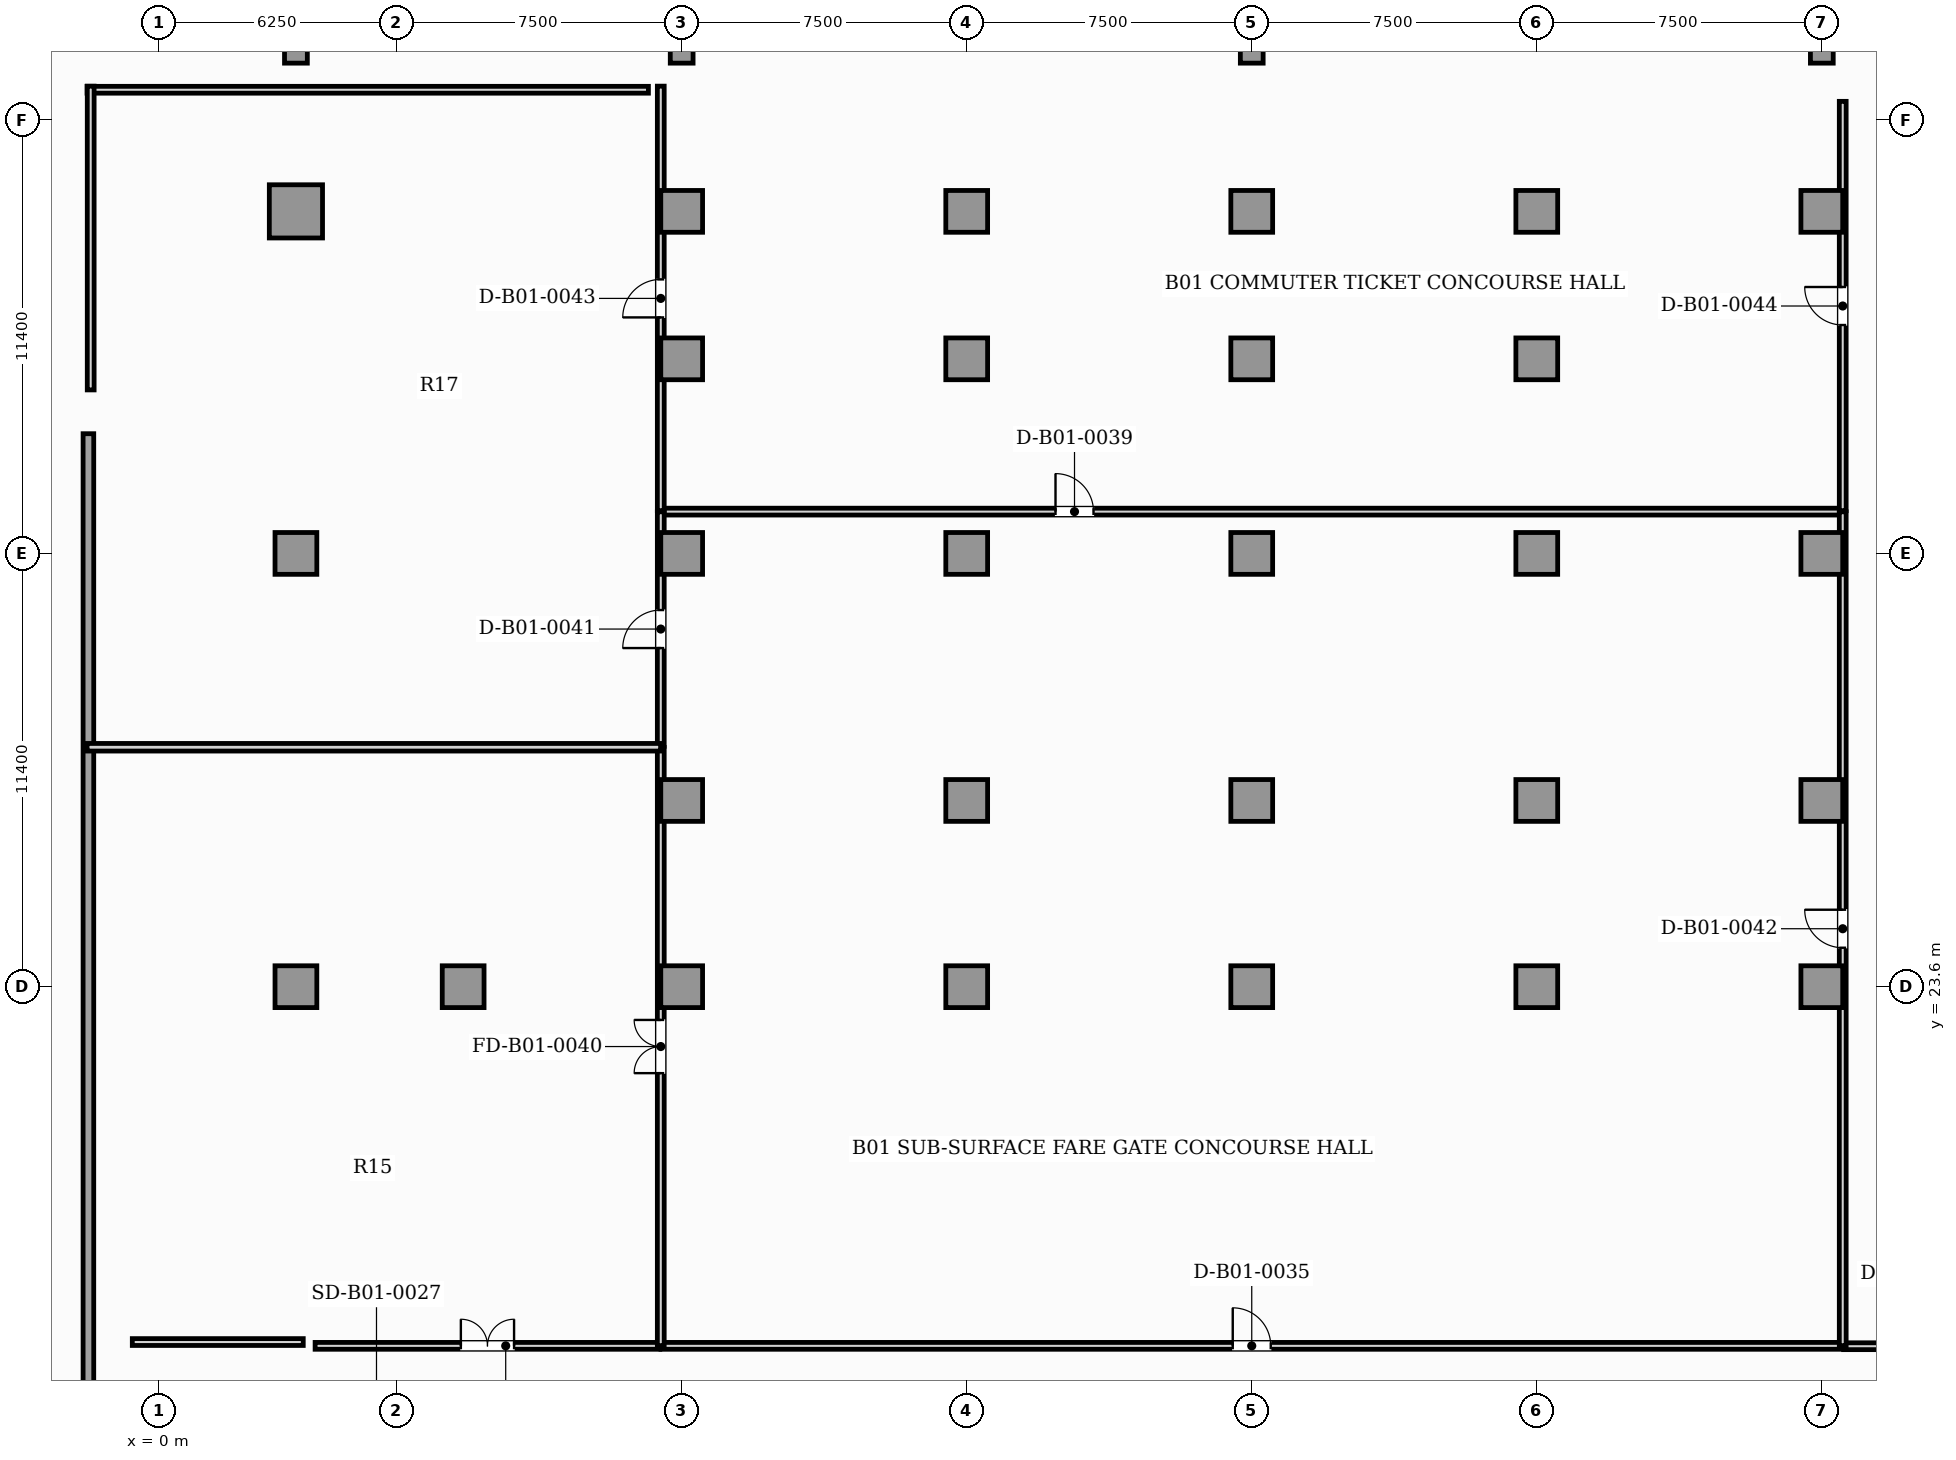
"""IFC4 building model, lengths in metres.
Left out: names, types, materials, properties, quantities, classifications, styles, units other than length and angle.
Written with IfcOpenShell. Run it as: python <this file> out.ifc"""

import sys

from ifc_helpers import new_model, si_unit, direction, frame, frame_2d, origin, origin_2d, place, context, subcontext, project, spatial, rectangle, hollow_rectangle, extrude, element, fill, save


model = new_model("IFC4")
c1 = context("Model", 3, precision=1e-05, world=origin(), true_north=direction((0.0, 1.0)))
c2 = subcontext(c1, "Body", "Model", "MODEL_VIEW")
j1 = project(units=[si_unit("LENGTHUNIT", "METRE"), si_unit("PLANEANGLEUNIT", "RADIAN")], contexts=[c1])
p1 = place(None, origin())
s1 = spatial("IfcSite", under=j1, at=p1, CompositionType="ELEMENT")
p2 = place(p1, origin())
s2 = spatial("IfcBuilding", under=s1, at=p2, CompositionType="ELEMENT")
p3 = place(p2, frame((0.0, 0.0, -5.4)))
s3 = spatial("IfcBuildingStorey", under=s2, at=p3, CompositionType="ELEMENT", Elevation=-5.4)
p4 = place(p3, frame((-1.86, 3.88, 0.0), z_axis=(0.0, 0.0, 1.0), x_axis=(0.0, 1.0, 0.0)))
e1 = element("IfcWall", 1, at=p4, inside=s3, PredefinedType="SHEAR", context=c2, shape_type="SweptSolid", body=[
    extrude(rectangle(XDim=34.27, YDim=0.28, at=frame_2d((17.135, 0.0))), origin(), (0.0, 0.0, 1.0), 5.05),
])
p5 = place(p3, frame((3.6, 44.0, 0.0), z_axis=(0.0, 0.0, 1.0), x_axis=(1.0, 0.0, 0.0)))
e2 = element("IfcColumn", 2, at=p5, inside=s3, PredefinedType="USERDEFINED", context=c2, shape_type="SweptSolid", body=[
    extrude(hollow_rectangle(XDim=1.4, YDim=1.4, WallThickness=0.08, at=origin_2d()), origin(), (0.0, 0.0, 1.0), 5.4),
])
for number, where, z_axis, x_axis in (
    (3, (3.6, 23.6, 0.0), (0.0, 0.0, 1.0), (1.0, 0.0, 0.0)),
    (4, (3.6, 35.0, 0.0), (0.0, 0.0, 1.0), (1.0, 0.0, 0.0)),
    (5, (13.75, 23.6, 0.0), (0.0, 0.0, 1.0), (1.0, 0.0, 0.0)),
    (6, (13.75, 35.0, 0.0), (0.0, 0.0, 1.0), (1.0, 0.0, 0.0)),
    (7, (13.75, 44.0, 0.0), (0.0, 0.0, 1.0), (1.0, 0.0, 0.0)),
    (8, (28.75, 23.6, 0.0), (0.0, 0.0, 1.0), (1.0, 0.0, 0.0)),
    (9, (28.75, 35.0, 0.0), (0.0, 0.0, 1.0), (1.0, 0.0, 0.0)),
    (10, (28.75, 44.0, 0.0), (0.0, 0.0, 1.0), (1.0, 0.0, 0.0)),
    (11, (43.75, 23.6, 0.0), (0.0, 0.0, 1.0), (1.0, 0.0, 0.0)),
    (12, (43.75, 35.0, 0.0), (0.0, 0.0, 1.0), (1.0, 0.0, 0.0)),
    (13, (43.75, 44.0, 0.0), (0.0, 0.0, 1.0), (1.0, 0.0, 0.0)),
    (14, (8.0, 23.6, 0.0), (0.0, 0.0, 1.0), (1.0, 0.0, 0.0)),
    (15, (21.25, 23.6, 0.0), (0.0, 0.0, 1.0), (1.0, 0.0, 0.0)),
    (16, (36.25, 23.6, 0.0), (0.0, 0.0, 1.0), (1.0, 0.0, 0.0)),
    (17, (13.75, 28.5, 0.0), (0.0, 0.0, 1.0), (1.0, 0.0, 0.0)),
    (18, (21.25, 28.5, 0.0), (0.0, 0.0, 1.0), (1.0, 0.0, 0.0)),
    (19, (28.75, 28.5, 0.0), (0.0, 0.0, 1.0), (1.0, 0.0, 0.0)),
    (20, (36.25, 28.5, 0.0), (0.0, 0.0, 1.0), (1.0, 0.0, 0.0)),
    (21, (43.75, 28.5, 0.0), (0.0, 0.0, 1.0), (1.0, 0.0, 0.0)),
    (22, (21.25, 35.0, 0.0), (0.0, 0.0, 1.0), (1.0, 0.0, 0.0)),
    (23, (36.25, 35.0, 0.0), (0.0, 0.0, 1.0), (1.0, 0.0, 0.0)),
    (24, (13.75, 40.12, 0.0), (0.0, 0.0, 1.0), (1.0, 0.0, 0.0)),
    (25, (21.25, 40.12, 0.0), (0.0, 0.0, 1.0), (1.0, 0.0, 0.0)),
    (26, (28.75, 40.12, 0.0), (0.0, 0.0, 1.0), (1.0, 0.0, 0.0)),
    (27, (36.25, 40.12, 0.0), (0.0, 0.0, 1.0), (1.0, 0.0, 0.0)),
    (28, (21.25, 44.0, 0.0), (0.0, 0.0, 1.0), (1.0, 0.0, 0.0)),
    (29, (36.25, 44.0, 0.0), (0.0, 0.0, 1.0), (1.0, 0.0, 0.0)),
):
    element("IfcColumn", number, at=place(p3, frame(where, z_axis=z_axis, x_axis=x_axis)), inside=s3, PredefinedType="COLUMN", context=c2, shape_type="SweptSolid", body=[
        extrude(rectangle(XDim=1.1, YDim=1.1, at=origin_2d()), origin(), (0.0, 0.0, 1.0), 5.4),
    ])
for number, where, z_axis, x_axis in (
    (30, (3.6, 48.2, 0.0), (0.0, 0.0, 1.0), (1.0, 0.0, 0.0)),
    (31, (13.75, 48.2, 0.0), (0.0, 0.0, 1.0), (1.0, 0.0, 0.0)),
    (32, (28.75, 48.2, 0.0), (0.0, 0.0, 1.0), (1.0, 0.0, 0.0)),
    (33, (43.75, 48.2, 0.0), (0.0, 0.0, 1.0), (1.0, 0.0, 0.0)),
):
    element("IfcColumn", number, at=place(p3, frame(where, z_axis=z_axis, x_axis=x_axis)), inside=s3, PredefinedType="COLUMN", context=c2, shape_type="SweptSolid", body=[
        extrude(hollow_rectangle(XDim=0.6, YDim=0.6, WallThickness=0.04, at=origin_2d()), origin(), (0.0, 0.0, 1.0), 5.4),
    ])
p6 = place(p3, frame((13.205, 14.15, 0.0), z_axis=(0.0, 0.0, 1.0), x_axis=(1.0, 0.0, 0.0)))
e34 = element("IfcWall", 34, at=p6, inside=s3, PredefinedType="PARTITIONING", context=c2, shape_type="SweptSolid", body=[
    extrude(rectangle(XDim=31.09, YDim=0.18, at=frame_2d((15.545, 0.0))), origin(), (0.0, 0.0, 1.0), 5.05),
])
p7 = place(p6, frame((15.045, 0.0, 0.0)))
e35 = element("IfcOpeningElement", 35, at=p7, cuts=e34, PredefinedType="OPENING", context=c2, shape_type="SweptSolid", body=[
    extrude(rectangle(XDim=1.0, YDim=2.15, at=frame_2d((0.5, 1.075))), frame((0.0, 0.1, 0.0), z_axis=(0.0, -1.0, 0.0), x_axis=(1.0, 0.0, 0.0)), (0.0, 0.0, 1.0), 0.2),
])
p8 = place(p3, frame((4.105, 14.15, 0.0), z_axis=(0.0, 0.0, 1.0), x_axis=(1.0, 0.0, 0.0)))
e36 = element("IfcWall", 36, at=p8, inside=s3, PredefinedType="PARTITIONING", context=c2, shape_type="SweptSolid", body=[
    extrude(rectangle(XDim=9.07, YDim=0.18, at=frame_2d((4.535, 0.0))), origin(), (0.0, 0.0, 1.0), 5.05),
])
p9 = place(p8, frame((3.835, 0.0, 0.0)))
e37 = element("IfcOpeningElement", 37, at=p9, cuts=e36, PredefinedType="OPENING", context=c2, shape_type="SweptSolid", body=[
    extrude(rectangle(XDim=1.4, YDim=2.2, at=frame_2d((0.7, 1.1))), frame((0.0, 0.1, 0.0), z_axis=(0.0, -1.0, 0.0), x_axis=(1.0, 0.0, 0.0)), (0.0, 0.0, 1.0), 0.2),
])
p10 = place(p3, frame((44.323, 14.14, 0.0), z_axis=(0.0, 0.0, 1.0), x_axis=(1.0, 0.0, 0.0)))
e38 = element("IfcWall", 38, at=p10, inside=s3, PredefinedType="PARTITIONING", context=c2, shape_type="SweptSolid", body=[
    extrude(rectangle(XDim=3.954, YDim=0.18, at=frame_2d((1.977, 0.0))), origin(), (0.0, 0.0, 1.0), 5.05),
])
p11 = place(p10, frame((1.477, 0.0, 0.0)))
e39 = element("IfcOpeningElement", 39, at=p11, cuts=e38, PredefinedType="OPENING", context=c2, shape_type="SweptSolid", body=[
    extrude(rectangle(XDim=1.0, YDim=2.15, at=frame_2d((0.5, 1.075))), frame((0.0, 0.1, 0.0), z_axis=(0.0, -1.0, 0.0), x_axis=(1.0, 0.0, 0.0)), (0.0, 0.0, 1.0), 0.2),
])
p12 = place(p3, frame((13.205, 36.1, 0.0), z_axis=(0.0, 0.0, 1.0), x_axis=(1.0, 0.0, 0.0)))
e40 = element("IfcWall", 40, at=p12, inside=s3, PredefinedType="PARTITIONING", context=c2, shape_type="SweptSolid", body=[
    extrude(rectangle(XDim=31.09, YDim=0.18, at=frame_2d((15.545, 0.0))), origin(), (0.0, 0.0, 1.0), 5.05),
])
p13 = place(p12, frame((10.382, 0.0, 0.0)))
e41 = element("IfcOpeningElement", 41, at=p13, cuts=e40, PredefinedType="OPENING", context=c2, shape_type="SweptSolid", body=[
    extrude(rectangle(XDim=1.0, YDim=2.15, at=frame_2d((0.5, 1.075))), frame((0.0, 0.1, 0.0), z_axis=(0.0, -1.0, 0.0), x_axis=(1.0, 0.0, 0.0)), (0.0, 0.0, 1.0), 0.2),
])
p14 = place(p3, frame((13.2, 14.155, 0.0), z_axis=(0.0, 0.0, 1.0), x_axis=(0.0, 1.0, 0.0)))
e42 = element("IfcWall", 42, at=p14, inside=s3, PredefinedType="PARTITIONING", context=c2, shape_type="SweptSolid", body=[
    extrude(rectangle(XDim=15.74, YDim=0.18, at=frame_2d((7.87, 0.0))), origin(), (0.0, 0.0, 1.0), 5.05),
])
p15 = place(p14, frame((7.17, 0.0, 0.0)))
e43 = element("IfcOpeningElement", 43, at=p15, cuts=e42, PredefinedType="OPENING", context=c2, shape_type="SweptSolid", body=[
    extrude(rectangle(XDim=1.4, YDim=2.2, at=frame_2d((0.7, 1.1))), frame((0.0, 0.1, 0.0), z_axis=(0.0, -1.0, 0.0), x_axis=(1.0, 0.0, 0.0)), (0.0, 0.0, 1.0), 0.2),
])
p16 = place(p3, frame((13.2, 29.925, 0.0), z_axis=(0.0, 0.0, 1.0), x_axis=(0.0, 1.0, 0.0)))
e44 = element("IfcWall", 44, at=p16, inside=s3, PredefinedType="PARTITIONING", context=c2, shape_type="SweptSolid", body=[
    extrude(rectangle(XDim=6.17, YDim=0.18, at=frame_2d((3.085, 0.0))), origin(), (0.0, 0.0, 1.0), 5.05),
])
p17 = place(p16, frame((2.585, 0.0, 0.0)))
e45 = element("IfcOpeningElement", 45, at=p17, cuts=e44, PredefinedType="OPENING", context=c2, shape_type="SweptSolid", body=[
    extrude(rectangle(XDim=1.0, YDim=2.15, at=frame_2d((0.5, 1.075))), frame((0.0, 0.1, 0.0), z_axis=(0.0, -1.0, 0.0), x_axis=(1.0, 0.0, 0.0)), (0.0, 0.0, 1.0), 0.2),
])
p18 = place(p3, frame((44.3, 14.155, 0.0), z_axis=(0.0, 0.0, 1.0), x_axis=(0.0, 1.0, 0.0)))
e46 = element("IfcWall", 46, at=p18, inside=s3, PredefinedType="PARTITIONING", context=c2, shape_type="SweptSolid", body=[
    extrude(rectangle(XDim=21.94, YDim=0.18, at=frame_2d((10.97, 0.0))), origin(), (0.0, 0.0, 1.0), 5.05),
])
p19 = place(p18, frame((10.47, 0.0, 0.0)))
e47 = element("IfcOpeningElement", 47, at=p19, cuts=e46, PredefinedType="OPENING", context=c2, shape_type="SweptSolid", body=[
    extrude(rectangle(XDim=1.0, YDim=2.15, at=frame_2d((0.5, 1.075))), frame((0.0, 0.1, 0.0), z_axis=(0.0, -1.0, 0.0), x_axis=(1.0, 0.0, 0.0)), (0.0, 0.0, 1.0), 0.2),
])
p20 = place(p3, frame((13.2, 36.125, 0.0), z_axis=(0.0, 0.0, 1.0), x_axis=(0.0, 1.0, 0.0)))
e48 = element("IfcWall", 48, at=p20, inside=s3, PredefinedType="PARTITIONING", context=c2, shape_type="SweptSolid", body=[
    extrude(rectangle(XDim=11.17, YDim=0.18, at=frame_2d((5.585, 0.0))), origin(), (0.0, 0.0, 1.0), 5.05),
])
p21 = place(p20, frame((5.085, 0.0, 0.0)))
e49 = element("IfcOpeningElement", 49, at=p21, cuts=e48, PredefinedType="OPENING", context=c2, shape_type="SweptSolid", body=[
    extrude(rectangle(XDim=1.0, YDim=2.15, at=frame_2d((0.5, 1.075))), frame((0.0, 0.1, 0.0), z_axis=(0.0, -1.0, 0.0), x_axis=(1.0, 0.0, 0.0)), (0.0, 0.0, 1.0), 0.2),
])
p22 = place(p3, frame((44.3, 36.125, 0.0), z_axis=(0.0, 0.0, 1.0), x_axis=(0.0, 1.0, 0.0)))
e50 = element("IfcWall", 50, at=p22, inside=s3, PredefinedType="PARTITIONING", context=c2, shape_type="SweptSolid", body=[
    extrude(rectangle(XDim=10.77, YDim=0.18, at=frame_2d((5.385, 0.0))), origin(), (0.0, 0.0, 1.0), 5.05),
])
p23 = place(p22, frame((4.885, 0.0, 0.0)))
e51 = element("IfcOpeningElement", 51, at=p23, cuts=e50, PredefinedType="OPENING", context=c2, shape_type="SweptSolid", body=[
    extrude(rectangle(XDim=1.0, YDim=2.15, at=frame_2d((0.5, 1.075))), frame((0.0, 0.1, 0.0), z_axis=(0.0, -1.0, 0.0), x_axis=(1.0, 0.0, 0.0)), (0.0, 0.0, 1.0), 0.2),
])
p24 = place(p3, frame((-1.895, 29.9, 0.0), z_axis=(0.0, 0.0, 1.0), x_axis=(1.0, 0.0, 0.0)))
e52 = element("IfcWall", 52, at=p24, inside=s3, PredefinedType="PARTITIONING", context=c2, shape_type="SweptSolid", body=[
    extrude(rectangle(XDim=15.09, YDim=0.2, at=frame_2d((7.545, 0.0))), origin(), (0.0, 0.0, 1.0), 5.05),
])
p25 = place(p3, frame((-0.705, 14.25, 0.0), z_axis=(0.0, 0.0, 1.0), x_axis=(1.0, 0.0, 0.0)))
e53 = element("IfcWall", 53, at=p25, inside=s3, PredefinedType="PARTITIONING", context=c2, shape_type="SweptSolid", body=[
    extrude(rectangle(XDim=4.498, YDim=0.18, at=frame_2d((2.249, 0.0))), origin(), (0.0, 0.0, 1.0), 5.05),
])
p26 = place(p3, frame((12.875, 47.2, 0.0), z_axis=(0.0, 0.0, 1.0), x_axis=(-1.0, 0.0, 0.0)))
e54 = element("IfcWall", 54, at=p26, inside=s3, PredefinedType="PARTITIONING", context=c2, shape_type="SweptSolid", body=[
    extrude(rectangle(XDim=14.77, YDim=0.18, at=frame_2d((7.385, 0.0))), origin(), (0.0, 0.0, 1.0), 4.433),
])
p27 = place(p3, frame((-1.8, 47.295, 0.0), z_axis=(0.0, 0.0, 1.0), x_axis=(0.0, -1.0, 0.0)))
e55 = element("IfcWall", 55, at=p27, inside=s3, PredefinedType="PARTITIONING", context=c2, shape_type="SweptSolid", body=[
    extrude(rectangle(XDim=7.993, YDim=0.18, at=frame_2d((3.997, 0.0))), origin(), (0.0, 0.0, 1.0), 5.05),
])
p28 = place(p7, origin())
e56 = element("IfcDoor", 56, at=p28, inside=s3, OperationType="SINGLE_SWING_LEFT", PredefinedType="DOOR", context=c2, shape_type="SweptSolid", body=[
    extrude(rectangle(XDim=1.0, YDim=2.15, at=frame_2d((0.5, 1.075))), frame((0.0, 0.025, 0.0), z_axis=(0.0, -1.0, 0.0), x_axis=(1.0, 0.0, 0.0)), (0.0, 0.0, 1.0), 0.05),
])
fill(e35, e56)
p29 = place(p9, origin())
e57 = element("IfcDoor", 57, at=p29, inside=s3, OperationType="DOUBLE_DOOR_SINGLE_SWING", PredefinedType="DOOR", context=c2, shape_type="SweptSolid", body=[
    extrude(rectangle(XDim=1.4, YDim=2.2, at=frame_2d((0.7, 1.1))), frame((0.0, 0.025, 0.0), z_axis=(0.0, -1.0, 0.0), x_axis=(1.0, 0.0, 0.0)), (0.0, 0.0, 1.0), 0.05),
])
fill(e37, e57)
p30 = place(p13, origin())
e58 = element("IfcDoor", 58, at=p30, inside=s3, OperationType="SINGLE_SWING_LEFT", PredefinedType="DOOR", context=c2, shape_type="SweptSolid", body=[
    extrude(rectangle(XDim=1.0, YDim=2.15, at=frame_2d((0.5, 1.075))), frame((0.0, 0.025, 0.0), z_axis=(0.0, -1.0, 0.0), x_axis=(1.0, 0.0, 0.0)), (0.0, 0.0, 1.0), 0.05),
])
fill(e41, e58)
p31 = place(p15, origin())
e59 = element("IfcDoor", 59, at=p31, inside=s3, OperationType="DOUBLE_DOOR_SINGLE_SWING", PredefinedType="DOOR", context=c2, shape_type="SweptSolid", body=[
    extrude(rectangle(XDim=1.4, YDim=2.2, at=frame_2d((0.7, 1.1))), frame((0.0, 0.025, 0.0), z_axis=(0.0, -1.0, 0.0), x_axis=(1.0, 0.0, 0.0)), (0.0, 0.0, 1.0), 0.05),
])
fill(e43, e59)
p32 = place(p17, origin())
e60 = element("IfcDoor", 60, at=p32, inside=s3, OperationType="SINGLE_SWING_LEFT", PredefinedType="DOOR", context=c2, shape_type="SweptSolid", body=[
    extrude(rectangle(XDim=1.0, YDim=2.15, at=frame_2d((0.5, 1.075))), frame((0.0, 0.025, 0.0), z_axis=(0.0, -1.0, 0.0), x_axis=(1.0, 0.0, 0.0)), (0.0, 0.0, 1.0), 0.05),
])
fill(e45, e60)
p33 = place(p19, origin())
e61 = element("IfcDoor", 61, at=p33, inside=s3, OperationType="SINGLE_SWING_RIGHT", PredefinedType="DOOR", context=c2, shape_type="SweptSolid", body=[
    extrude(rectangle(XDim=1.0, YDim=2.15, at=frame_2d((0.5, 1.075))), frame((0.0, 0.025, 0.0), z_axis=(0.0, -1.0, 0.0), x_axis=(1.0, 0.0, 0.0)), (0.0, 0.0, 1.0), 0.05),
])
fill(e47, e61)
p34 = place(p21, origin())
e62 = element("IfcDoor", 62, at=p34, inside=s3, OperationType="SINGLE_SWING_LEFT", PredefinedType="DOOR", context=c2, shape_type="SweptSolid", body=[
    extrude(rectangle(XDim=1.0, YDim=2.15, at=frame_2d((0.5, 1.075))), frame((0.0, 0.025, 0.0), z_axis=(0.0, -1.0, 0.0), x_axis=(1.0, 0.0, 0.0)), (0.0, 0.0, 1.0), 0.05),
])
fill(e49, e62)
p35 = place(p23, origin())
e63 = element("IfcDoor", 63, at=p35, inside=s3, OperationType="SINGLE_SWING_RIGHT", PredefinedType="DOOR", context=c2, shape_type="SweptSolid", body=[
    extrude(rectangle(XDim=1.0, YDim=2.15, at=frame_2d((0.5, 1.075))), frame((0.0, 0.025, 0.0), z_axis=(0.0, -1.0, 0.0), x_axis=(1.0, 0.0, 0.0)), (0.0, 0.0, 1.0), 0.05),
])
fill(e51, e63)
save(model, sys.argv[1])
